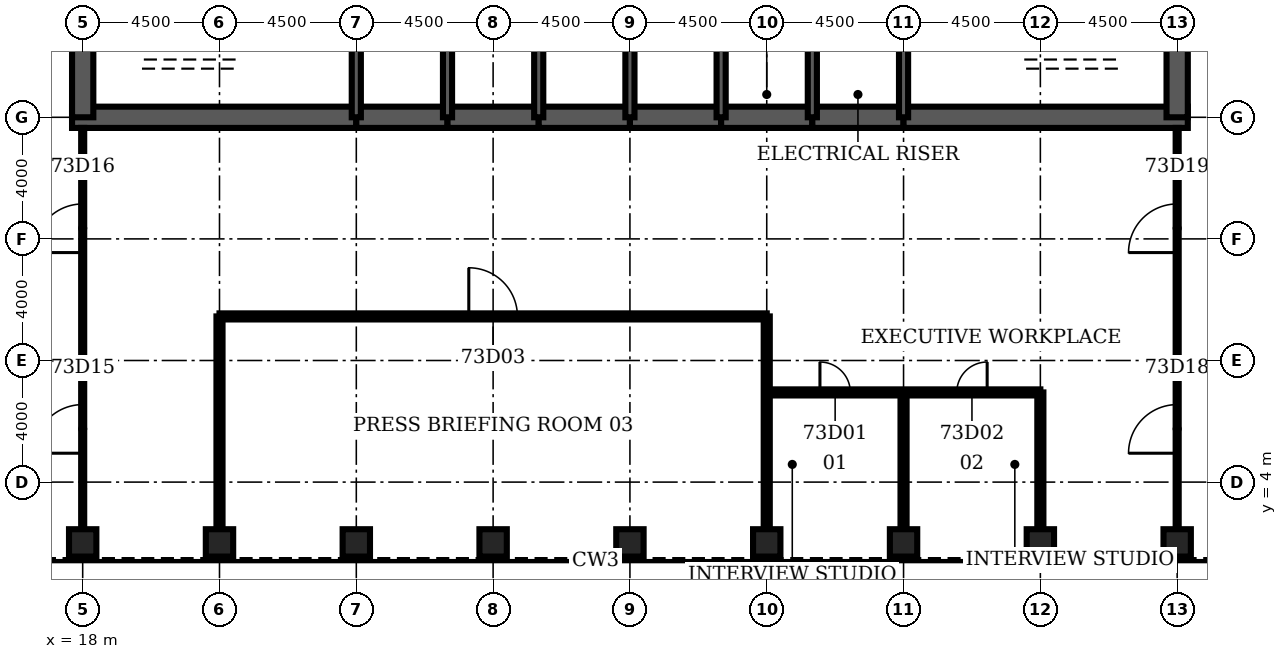
"""IFC4 building model, lengths in metres.
Left out: names, types, materials, properties, quantities, classifications, styles, units other than length and angle.
Written with IfcOpenShell. Run it as: python <this file> out.ifc"""

import sys

from ifc_helpers import new_model, si_unit, direction, frame, frame_2d, origin, origin_2d, place, context, subcontext, project, spatial, rectangle, hollow_rectangle, extrude, element, fill, save


model = new_model("IFC4")
c1 = context("Model", 3, precision=1e-05, world=origin(), true_north=direction((0.0, 1.0)))
c2 = subcontext(c1, "Body", "Model", "MODEL_VIEW")
j1 = project(units=[si_unit("LENGTHUNIT", "METRE"), si_unit("PLANEANGLEUNIT", "RADIAN")], contexts=[c1])
p1 = place(None, origin())
s1 = spatial("IfcSite", under=j1, at=p1, CompositionType="ELEMENT")
p2 = place(p1, origin())
s2 = spatial("IfcBuilding", under=s1, at=p2, CompositionType="ELEMENT")
p3 = place(p2, frame((0.0, 0.0, 321.5)))
s3 = spatial("IfcBuildingStorey", under=s2, at=p3, CompositionType="ELEMENT", Elevation=321.5)
for number, where, z_axis, x_axis in (
    (1, (18.0, 2.0, 0.0), (0.0, 0.0, 1.0), (0.0, 1.0, 0.0)),
    (2, (22.5, 2.0, 0.0), (0.0, 0.0, 1.0), (0.0, 1.0, 0.0)),
    (3, (27.0, 2.0, 0.0), (0.0, 0.0, 1.0), (0.0, 1.0, 0.0)),
    (4, (31.5, 2.0, 0.0), (0.0, 0.0, 1.0), (0.0, 1.0, 0.0)),
    (5, (36.0, 2.0, 0.0), (0.0, 0.0, 1.0), (0.0, 1.0, 0.0)),
    (6, (40.5, 2.0, 0.0), (0.0, 0.0, 1.0), (0.0, 1.0, 0.0)),
    (7, (45.0, 2.0, 0.0), (0.0, 0.0, 1.0), (0.0, 1.0, 0.0)),
    (8, (49.5, 2.0, 0.0), (0.0, 0.0, 1.0), (0.0, 1.0, 0.0)),
    (9, (54.0, 2.0, 0.0), (0.0, 0.0, 1.0), (0.0, 1.0, 0.0)),
):
    element("IfcColumn", number, at=place(p3, frame(where, z_axis=z_axis, x_axis=x_axis)), inside=s3, PredefinedType="COLUMN", context=c2, shape_type="SweptSolid", body=[
        extrude(hollow_rectangle(XDim=0.9, YDim=0.9, WallThickness=0.05, at=origin_2d()), origin(), (0.0, 0.0, 1.0), 4.2),
    ])
p4 = place(p3, frame((17.65, 16.0, 0.0), z_axis=(0.0, 0.0, 1.0), x_axis=(1.0, 0.0, 0.0)))
e10 = element("IfcWall", 10, at=p4, inside=s3, PredefinedType="SHEAR", context=c2, shape_type="SweptSolid", body=[
    extrude(rectangle(XDim=9.35, YDim=0.7, at=frame_2d((4.675, 0.0))), origin(), (0.0, 0.0, 1.0), 4.2),
])
for number, where, z_axis, x_axis in (
    (11, (27.0, 16.0, 0.0), (0.0, 0.0, 1.0), (1.0, 0.0, 0.0)),
    (12, (30.0, 16.0, 0.0), (0.0, 0.0, 1.0), (1.0, 0.0, 0.0)),
    (13, (33.0, 16.0, 0.0), (0.0, 0.0, 1.0), (1.0, 0.0, 0.0)),
    (14, (36.0, 16.0, 0.0), (0.0, 0.0, 1.0), (1.0, 0.0, 0.0)),
    (15, (39.0, 16.0, 0.0), (0.0, 0.0, 1.0), (1.0, 0.0, 0.0)),
    (16, (42.0, 16.0, 0.0), (0.0, 0.0, 1.0), (1.0, 0.0, 0.0)),
):
    element("IfcWall", number, at=place(p3, frame(where, z_axis=z_axis, x_axis=x_axis)), inside=s3, PredefinedType="SHEAR", context=c2, shape_type="SweptSolid", body=[
        extrude(rectangle(XDim=3.0, YDim=0.7, at=frame_2d((1.5, 0.0))), origin(), (0.0, 0.0, 1.0), 4.2),
    ])
p5 = place(p3, frame((45.0, 16.0, 0.0), z_axis=(0.0, 0.0, 1.0), x_axis=(1.0, 0.0, 0.0)))
e17 = element("IfcWall", 17, at=p5, inside=s3, PredefinedType="SHEAR", context=c2, shape_type="SweptSolid", body=[
    extrude(rectangle(XDim=9.35, YDim=0.7, at=frame_2d((4.675, 0.0))), origin(), (0.0, 0.0, 1.0), 4.2),
])
for number, where, z_axis, x_axis in (
    (18, (18.0, 19.2, 0.0), (0.0, 0.0, 1.0), (0.0, -1.0, 0.0)),
    (19, (54.0, 16.0, 0.0), (0.0, 0.0, 1.0), (0.0, 1.0, 0.0)),
):
    element("IfcWall", number, at=place(p3, frame(where, z_axis=z_axis, x_axis=x_axis)), inside=s3, PredefinedType="SHEAR", context=c2, shape_type="SweptSolid", body=[
        extrude(rectangle(XDim=3.2, YDim=0.7, at=frame_2d((1.6, 0.0))), origin(), (0.0, 0.0, 1.0), 4.2),
    ])
for number, where, z_axis, x_axis in (
    (20, (27.0, 16.0, 0.0), (0.0, 0.0, 1.0), (0.0, 1.0, 0.0)),
    (21, (30.0, 16.0, 0.0), (0.0, 0.0, 1.0), (0.0, 1.0, 0.0)),
    (22, (33.0, 16.0, 0.0), (0.0, 0.0, 1.0), (0.0, 1.0, 0.0)),
    (23, (36.0, 16.0, 0.0), (0.0, 0.0, 1.0), (0.0, 1.0, 0.0)),
    (24, (39.0, 16.0, 0.0), (0.0, 0.0, 1.0), (0.0, 1.0, 0.0)),
    (25, (42.0, 16.0, 0.0), (0.0, 0.0, 1.0), (0.0, 1.0, 0.0)),
    (26, (45.0, 16.0, 0.0), (0.0, 0.0, 1.0), (0.0, 1.0, 0.0)),
):
    element("IfcWall", number, at=place(p3, frame(where, z_axis=z_axis, x_axis=x_axis)), inside=s3, PredefinedType="SOLIDWALL", context=c2, shape_type="SweptSolid", body=[
        extrude(rectangle(XDim=3.2, YDim=0.3, at=frame_2d((1.6, 0.0))), origin(), (0.0, 0.0, 1.0), 4.2),
    ])
p6 = place(p3, frame((39.15, 17.3, 0.0), z_axis=(0.0, 0.0, 1.0), x_axis=(1.0, 0.0, 0.0)))
e27 = element("IfcWall", 27, at=p6, inside=s3, PredefinedType="SOLIDWALL", context=c2, shape_type="SweptSolid", body=[
    extrude(rectangle(XDim=2.7, YDim=0.3, at=frame_2d((1.35, 0.0))), origin(), (0.0, 0.0, 1.0), 4.04),
])
p7 = place(p6, frame((0.85, 0.0, 0.0)))
e28 = element("IfcOpeningElement", 28, at=p7, cuts=e27, PredefinedType="OPENING", context=c2, shape_type="SweptSolid", body=[
    extrude(rectangle(XDim=1.0, YDim=2.1, at=frame_2d((0.5, 1.05))), frame((0.0, 0.16, 0.0), z_axis=(0.0, -1.0, 0.0), x_axis=(1.0, 0.0, 0.0)), (0.0, 0.0, 1.0), 0.32),
])
p8 = place(p3, frame((42.15, 17.3, 0.0), z_axis=(0.0, 0.0, 1.0), x_axis=(1.0, 0.0, 0.0)))
e29 = element("IfcWall", 29, at=p8, inside=s3, PredefinedType="SOLIDWALL", context=c2, shape_type="SweptSolid", body=[
    extrude(rectangle(XDim=2.7, YDim=0.3, at=frame_2d((1.35, 0.0))), origin(), (0.0, 0.0, 1.0), 4.04),
])
p9 = place(p8, frame((0.85, 0.0, 0.0)))
e30 = element("IfcOpeningElement", 30, at=p9, cuts=e29, PredefinedType="OPENING", context=c2, shape_type="SweptSolid", body=[
    extrude(rectangle(XDim=1.0, YDim=2.1, at=frame_2d((0.5, 1.05))), frame((0.0, 0.16, 0.0), z_axis=(0.0, -1.0, 0.0), x_axis=(1.0, 0.0, 0.0)), (0.0, 0.0, 1.0), 0.32),
])
p10 = place(p3, frame((40.5, 6.95, 0.0), z_axis=(0.0, 0.0, 1.0), x_axis=(1.0, 0.0, 0.0)))
e31 = element("IfcWall", 31, at=p10, inside=s3, PredefinedType="PARTITIONING", context=c2, shape_type="SweptSolid", body=[
    extrude(rectangle(XDim=9.0, YDim=0.2, at=frame_2d((4.5, 0.0))), origin(), (0.0, 0.0, 1.0), 3.0),
])
p11 = place(p10, frame((1.75, 0.0, 0.0)))
e32 = element("IfcOpeningElement", 32, at=p11, cuts=e31, PredefinedType="OPENING", context=c2, shape_type="SweptSolid", body=[
    extrude(rectangle(XDim=1.0, YDim=2.1, at=frame_2d((0.5, 1.05))), frame((0.0, 0.11, 0.0), z_axis=(0.0, -1.0, 0.0), x_axis=(1.0, 0.0, 0.0)), (0.0, 0.0, 1.0), 0.22),
])
p12 = place(p10, frame((6.25, 0.0, 0.0)))
e33 = element("IfcOpeningElement", 33, at=p12, cuts=e31, PredefinedType="OPENING", context=c2, shape_type="SweptSolid", body=[
    extrude(rectangle(XDim=1.0, YDim=2.1, at=frame_2d((0.5, 1.05))), frame((0.0, 0.11, 0.0), z_axis=(0.0, -1.0, 0.0), x_axis=(1.0, 0.0, 0.0)), (0.0, 0.0, 1.0), 0.22),
])
p13 = place(p3, frame((22.5, 9.45, 0.0), z_axis=(0.0, 0.0, 1.0), x_axis=(1.0, 0.0, 0.0)))
e34 = element("IfcWall", 34, at=p13, inside=s3, PredefinedType="PARTITIONING", context=c2, shape_type="SweptSolid", body=[
    extrude(rectangle(XDim=18.0, YDim=0.2, at=frame_2d((9.0, 0.0))), origin(), (0.0, 0.0, 1.0), 3.0),
])
p14 = place(p13, frame((8.2, 0.0, 0.0)))
e35 = element("IfcOpeningElement", 35, at=p14, cuts=e34, PredefinedType="OPENING", context=c2, shape_type="SweptSolid", body=[
    extrude(rectangle(XDim=1.6, YDim=2.1, at=frame_2d((0.8, 1.05))), frame((0.0, 0.11, 0.0), z_axis=(0.0, -1.0, 0.0), x_axis=(1.0, 0.0, 0.0)), (0.0, 0.0, 1.0), 0.22),
])
p15 = place(p3, frame((18.0, 2.45, 0.0), z_axis=(0.0, 0.0, 1.0), x_axis=(0.0, 1.0, 0.0)))
e36 = element("IfcWall", 36, at=p15, inside=s3, PredefinedType="PARTITIONING", context=c2, shape_type="SweptSolid", body=[
    extrude(rectangle(XDim=13.2, YDim=0.1, at=frame_2d((6.6, 0.0))), origin(), (0.0, 0.0, 1.0), 3.0),
])
p16 = place(p15, frame((2.5, 0.0, 0.0)))
e37 = element("IfcOpeningElement", 37, at=p16, cuts=e36, PredefinedType="OPENING", context=c2, shape_type="SweptSolid", body=[
    extrude(rectangle(XDim=1.6, YDim=2.1, at=frame_2d((0.8, 1.05))), frame((0.0, 0.06, 0.0), z_axis=(0.0, -1.0, 0.0), x_axis=(1.0, 0.0, 0.0)), (0.0, 0.0, 1.0), 0.12),
])
p17 = place(p15, frame((9.1, 0.0, 0.0)))
e38 = element("IfcOpeningElement", 38, at=p17, cuts=e36, PredefinedType="OPENING", context=c2, shape_type="SweptSolid", body=[
    extrude(rectangle(XDim=1.6, YDim=2.1, at=frame_2d((0.8, 1.05))), frame((0.0, 0.06, 0.0), z_axis=(0.0, -1.0, 0.0), x_axis=(1.0, 0.0, 0.0)), (0.0, 0.0, 1.0), 0.12),
])
for number, where, z_axis, x_axis in (
    (39, (22.5, 2.45, 0.0), (0.0, 0.0, 1.0), (0.0, 1.0, 0.0)),
    (40, (40.5, 2.45, 0.0), (0.0, 0.0, 1.0), (0.0, 1.0, 0.0)),
):
    element("IfcWall", number, at=place(p3, frame(where, z_axis=z_axis, x_axis=x_axis)), inside=s3, PredefinedType="PARTITIONING", context=c2, shape_type="SweptSolid", body=[
        extrude(rectangle(XDim=7.0, YDim=0.2, at=frame_2d((3.5, 0.0))), origin(), (0.0, 0.0, 1.0), 3.0),
    ])
for number, where, z_axis, x_axis in (
    (41, (45.0, 2.45, 0.0), (0.0, 0.0, 1.0), (0.0, 1.0, 0.0)),
    (42, (49.5, 2.45, 0.0), (0.0, 0.0, 1.0), (0.0, 1.0, 0.0)),
):
    element("IfcWall", number, at=place(p3, frame(where, z_axis=z_axis, x_axis=x_axis)), inside=s3, PredefinedType="PARTITIONING", context=c2, shape_type="SweptSolid", body=[
        extrude(rectangle(XDim=4.5, YDim=0.2, at=frame_2d((2.25, 0.0))), origin(), (0.0, 0.0, 1.0), 3.0),
    ])
p18 = place(p3, frame((54.0, 2.45, 0.0), z_axis=(0.0, 0.0, 1.0), x_axis=(0.0, 1.0, 0.0)))
e43 = element("IfcWall", 43, at=p18, inside=s3, PredefinedType="PARTITIONING", context=c2, shape_type="SweptSolid", body=[
    extrude(rectangle(XDim=13.2, YDim=0.1, at=frame_2d((6.6, 0.0))), origin(), (0.0, 0.0, 1.0), 3.0),
])
p19 = place(p18, frame((2.5, 0.0, 0.0)))
e44 = element("IfcOpeningElement", 44, at=p19, cuts=e43, PredefinedType="OPENING", context=c2, shape_type="SweptSolid", body=[
    extrude(rectangle(XDim=1.6, YDim=2.1, at=frame_2d((0.8, 1.05))), frame((0.0, 0.06, 0.0), z_axis=(0.0, -1.0, 0.0), x_axis=(1.0, 0.0, 0.0)), (0.0, 0.0, 1.0), 0.12),
])
p20 = place(p18, frame((9.1, 0.0, 0.0)))
e45 = element("IfcOpeningElement", 45, at=p20, cuts=e43, PredefinedType="OPENING", context=c2, shape_type="SweptSolid", body=[
    extrude(rectangle(XDim=1.6, YDim=2.1, at=frame_2d((0.8, 1.05))), frame((0.0, 0.06, 0.0), z_axis=(0.0, -1.0, 0.0), x_axis=(1.0, 0.0, 0.0)), (0.0, 0.0, 1.0), 0.12),
])
p21 = place(p7, origin())
e46 = element("IfcDoor", 46, at=p21, inside=s3, OperationType="SINGLE_SWING_LEFT", PredefinedType="DOOR", context=c2, shape_type="SweptSolid", body=[
    extrude(rectangle(XDim=1.0, YDim=2.1, at=frame_2d((0.5, 1.05))), frame((0.0, 0.025, 0.0), z_axis=(0.0, -1.0, 0.0), x_axis=(1.0, 0.0, 0.0)), (0.0, 0.0, 1.0), 0.05),
])
fill(e28, e46)
p22 = place(p9, origin())
e47 = element("IfcDoor", 47, at=p22, inside=s3, OperationType="SINGLE_SWING_LEFT", PredefinedType="DOOR", context=c2, shape_type="SweptSolid", body=[
    extrude(rectangle(XDim=1.0, YDim=2.1, at=frame_2d((0.5, 1.05))), frame((0.0, 0.025, 0.0), z_axis=(0.0, -1.0, 0.0), x_axis=(1.0, 0.0, 0.0)), (0.0, 0.0, 1.0), 0.05),
])
fill(e30, e47)
p23 = place(p11, origin())
e48 = element("IfcDoor", 48, at=p23, inside=s3, OperationType="SINGLE_SWING_LEFT", PredefinedType="DOOR", context=c2, shape_type="SweptSolid", body=[
    extrude(rectangle(XDim=1.0, YDim=2.1, at=frame_2d((0.5, 1.05))), frame((0.0, 0.025, 0.0), z_axis=(0.0, -1.0, 0.0), x_axis=(1.0, 0.0, 0.0)), (0.0, 0.0, 1.0), 0.05),
])
fill(e32, e48)
p24 = place(p12, origin())
e49 = element("IfcDoor", 49, at=p24, inside=s3, OperationType="SINGLE_SWING_RIGHT", PredefinedType="DOOR", context=c2, shape_type="SweptSolid", body=[
    extrude(rectangle(XDim=1.0, YDim=2.1, at=frame_2d((0.5, 1.05))), frame((0.0, 0.025, 0.0), z_axis=(0.0, -1.0, 0.0), x_axis=(1.0, 0.0, 0.0)), (0.0, 0.0, 1.0), 0.05),
])
fill(e33, e49)
p25 = place(p14, origin())
e50 = element("IfcDoor", 50, at=p25, inside=s3, OperationType="SINGLE_SWING_LEFT", PredefinedType="DOOR", context=c2, shape_type="SweptSolid", body=[
    extrude(rectangle(XDim=1.6, YDim=2.1, at=frame_2d((0.8, 1.05))), frame((0.0, 0.025, 0.0), z_axis=(0.0, -1.0, 0.0), x_axis=(1.0, 0.0, 0.0)), (0.0, 0.0, 1.0), 0.05),
])
fill(e35, e50)
p26 = place(p16, origin())
e51 = element("IfcDoor", 51, at=p26, inside=s3, OperationType="SINGLE_SWING_LEFT", PredefinedType="DOOR", context=c2, shape_type="SweptSolid", body=[
    extrude(rectangle(XDim=1.6, YDim=2.1, at=frame_2d((0.8, 1.05))), frame((0.0, 0.025, 0.0), z_axis=(0.0, -1.0, 0.0), x_axis=(1.0, 0.0, 0.0)), (0.0, 0.0, 1.0), 0.05),
])
fill(e37, e51)
p27 = place(p17, origin())
e52 = element("IfcDoor", 52, at=p27, inside=s3, OperationType="SINGLE_SWING_LEFT", PredefinedType="DOOR", context=c2, shape_type="SweptSolid", body=[
    extrude(rectangle(XDim=1.6, YDim=2.1, at=frame_2d((0.8, 1.05))), frame((0.0, 0.025, 0.0), z_axis=(0.0, -1.0, 0.0), x_axis=(1.0, 0.0, 0.0)), (0.0, 0.0, 1.0), 0.05),
])
fill(e38, e52)
p28 = place(p19, origin())
e53 = element("IfcDoor", 53, at=p28, inside=s3, OperationType="SINGLE_SWING_LEFT", PredefinedType="DOOR", context=c2, shape_type="SweptSolid", body=[
    extrude(rectangle(XDim=1.6, YDim=2.1, at=frame_2d((0.8, 1.05))), frame((0.0, 0.025, 0.0), z_axis=(0.0, -1.0, 0.0), x_axis=(1.0, 0.0, 0.0)), (0.0, 0.0, 1.0), 0.05),
])
fill(e44, e53)
p29 = place(p20, origin())
e54 = element("IfcDoor", 54, at=p29, inside=s3, OperationType="SINGLE_SWING_LEFT", PredefinedType="DOOR", context=c2, shape_type="SweptSolid", body=[
    extrude(rectangle(XDim=1.6, YDim=2.1, at=frame_2d((0.8, 1.05))), frame((0.0, 0.025, 0.0), z_axis=(0.0, -1.0, 0.0), x_axis=(1.0, 0.0, 0.0)), (0.0, 0.0, 1.0), 0.05),
])
fill(e45, e54)
save(model, sys.argv[1])
